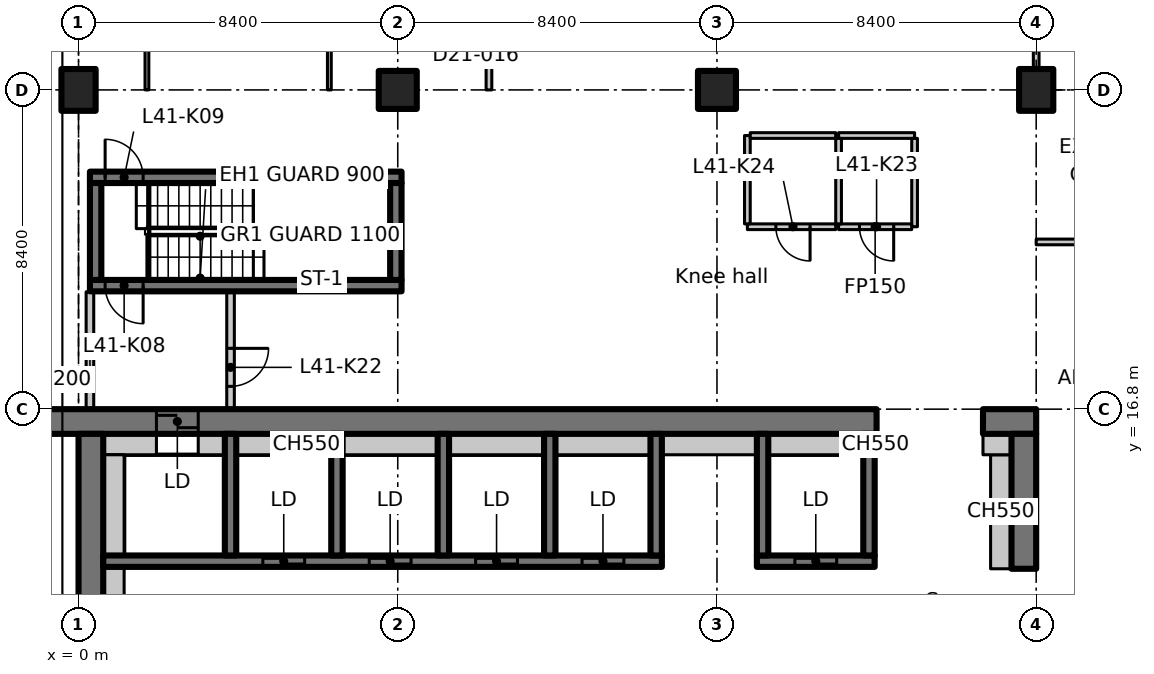
"""IFC4 building model, lengths in metres.
Left out: names, types, materials, properties, quantities, classifications, styles, units other than length and angle.
Written with IfcOpenShell. Run it as: python <this file> out.ifc"""

import sys

from ifc_helpers import new_model, si_unit, direction, frame, frame_2d, origin, origin_2d, place, context, subcontext, project, spatial, polyline, rectangle, outline, extrude, element, fill, save


model = new_model("IFC4")
c1 = context("Model", 3, precision=1e-05, world=origin(), true_north=direction((0.0, 1.0)))
c2 = subcontext(c1, "Body", "Model", "MODEL_VIEW")
j1 = project(units=[si_unit("LENGTHUNIT", "METRE"), si_unit("PLANEANGLEUNIT", "RADIAN")], contexts=[c1])
p1 = place(None, origin())
s1 = spatial("IfcSite", under=j1, at=p1, CompositionType="ELEMENT")
p2 = place(p1, origin())
s2 = spatial("IfcBuilding", under=s1, at=p2, CompositionType="ELEMENT")
p3 = place(p2, frame((0.0, 0.0, 166.8)))
s3 = spatial("IfcBuildingStorey", under=s2, at=p3, CompositionType="ELEMENT", Elevation=166.8)
p4 = place(p3, frame((0.0, 25.2, 0.0), z_axis=(0.0, 0.0, 1.0), x_axis=(1.0, 0.0, 0.0)))
e1 = element("IfcColumn", 1, at=p4, inside=s3, PredefinedType="COLUMN", context=c2, shape_type="SweptSolid", body=[
    extrude(rectangle(XDim=0.9, YDim=1.1, at=origin_2d()), origin(), (0.0, 0.0, 1.0), 3.35),
])
for number, where, z_axis, x_axis in (
    (2, (8.4, 25.2, 0.0), (0.0, 0.0, 1.0), (1.0, 0.0, 0.0)),
    (3, (16.8, 25.2, 0.0), (0.0, 0.0, 1.0), (1.0, 0.0, 0.0)),
):
    element("IfcColumn", number, at=place(p3, frame(where, z_axis=z_axis, x_axis=x_axis)), inside=s3, PredefinedType="COLUMN", context=c2, shape_type="SweptSolid", body=[
        extrude(rectangle(XDim=1.0, YDim=1.0, at=origin_2d()), origin(), (0.0, 0.0, 1.0), 3.35),
    ])
p5 = place(p3, frame((25.2, 25.2, 0.0), z_axis=(0.0, 0.0, 1.0), x_axis=(1.0, 0.0, 0.0)))
e4 = element("IfcColumn", 4, at=p5, inside=s3, PredefinedType="COLUMN", context=c2, shape_type="SweptSolid", body=[
    extrude(rectangle(XDim=0.9, YDim=1.1, at=origin_2d()), origin(), (0.0, 0.0, 1.0), 3.35),
])
p6 = place(p3, frame((-1.1, 16.475, 0.0), z_axis=(0.0, 0.0, 1.0), x_axis=(1.0, 0.0, 0.0)))
e5 = element("IfcWall", 5, at=p6, inside=s3, PredefinedType="SHEAR", context=c2, shape_type="SweptSolid", body=[
    extrude(rectangle(XDim=22.1, YDim=0.65, at=frame_2d((11.05, 0.0))), origin(), (0.0, 0.0, 1.0), 3.35),
])
p7 = place(p6, frame((3.15, 0.0, 0.0)))
e6 = element("IfcOpeningElement", 6, at=p7, cuts=e5, PredefinedType="OPENING", context=c2, shape_type="SweptSolid", body=[
    extrude(rectangle(XDim=1.1, YDim=2.3, at=frame_2d((0.55, 1.15))), frame((0.0, 0.335, 0.0), z_axis=(0.0, -1.0, 0.0), x_axis=(1.0, 0.0, 0.0)), (0.0, 0.0, 1.0), 0.67),
])
p8 = place(p3, frame((23.8, 16.475, 0.0), z_axis=(0.0, 0.0, 1.0), x_axis=(1.0, 0.0, 0.0)))
e7 = element("IfcWall", 7, at=p8, inside=s3, PredefinedType="SHEAR", context=c2, shape_type="SweptSolid", body=[
    extrude(rectangle(XDim=1.4, YDim=0.65, at=frame_2d((0.7, 0.0))), origin(), (0.0, 0.0, 1.0), 3.35),
])
p9 = place(p3, frame((0.325, 7.286, 0.0), z_axis=(0.0, 0.0, 1.0), x_axis=(0.0, 1.0, 0.0)))
e8 = element("IfcWall", 8, at=p9, inside=s3, PredefinedType="SHEAR", context=c2, shape_type="SweptSolid", body=[
    extrude(rectangle(XDim=8.864, YDim=0.65, at=frame_2d((4.432, 0.0))), origin(), (0.0, 0.0, 1.0), 3.35),
])
p10 = place(p3, frame((24.875, 12.6, 0.0), z_axis=(0.0, 0.0, 1.0), x_axis=(0.0, 1.0, 0.0)))
e9 = element("IfcWall", 9, at=p10, inside=s3, PredefinedType="SHEAR", context=c2, shape_type="SweptSolid", body=[
    extrude(rectangle(XDim=3.55, YDim=0.65, at=frame_2d((1.775, 0.0))), origin(), (0.0, 0.0, 1.0), 3.35),
])
p11 = place(p3, frame((24.275, 12.6, 0.0), z_axis=(0.0, 0.0, 1.0), x_axis=(0.0, 1.0, 0.0)))
e10 = element("IfcWall", 10, at=p11, inside=s3, PredefinedType="PARTITIONING", context=c2, shape_type="SweptSolid", body=[
    extrude(rectangle(XDim=3.0, YDim=0.55, at=frame_2d((1.5, 0.0))), origin(), (0.0, 0.0, 1.0), 3.35),
])
p12 = place(p3, frame((0.65, 15.875, 0.0), z_axis=(0.0, 0.0, 1.0), x_axis=(1.0, 0.0, 0.0)))
e11 = element("IfcWall", 11, at=p12, inside=s3, PredefinedType="PARTITIONING", context=c2, shape_type="SweptSolid", body=[
    extrude(rectangle(XDim=1.4, YDim=0.55, at=frame_2d((0.7, 0.0))), origin(), (0.0, 0.0, 1.0), 3.35),
])
p13 = place(p3, frame((23.8, 15.875, 0.0), z_axis=(0.0, 0.0, 1.0), x_axis=(1.0, 0.0, 0.0)))
e12 = element("IfcWall", 12, at=p13, inside=s3, PredefinedType="PARTITIONING", context=c2, shape_type="SweptSolid", body=[
    extrude(rectangle(XDim=0.75, YDim=0.55, at=frame_2d((0.375, 0.0))), origin(), (0.0, 0.0, 1.0), 3.35),
])
p14 = place(p3, frame((0.65, 12.8, 0.0), z_axis=(0.0, 0.0, 1.0), x_axis=(1.0, 0.0, 0.0)))
e13 = element("IfcWall", 13, at=p14, inside=s3, PredefinedType="SHEAR", context=c2, shape_type="SweptSolid", body=[
    extrude(rectangle(XDim=14.7, YDim=0.3, at=frame_2d((7.35, 0.0))), origin(), (0.0, 0.0, 1.0), 3.35),
])
p15 = place(p14, frame((4.2, 0.0, 0.0)))
e14 = element("IfcOpeningElement", 14, at=p15, cuts=e13, PredefinedType="OPENING", context=c2, shape_type="SweptSolid", body=[
    extrude(rectangle(XDim=1.1, YDim=2.3, at=frame_2d((0.55, 1.15))), frame((0.0, 0.16, 0.0), z_axis=(0.0, -1.0, 0.0), x_axis=(1.0, 0.0, 0.0)), (0.0, 0.0, 1.0), 0.32),
])
p16 = place(p14, frame((7.0, 0.0, 0.0)))
e15 = element("IfcOpeningElement", 15, at=p16, cuts=e13, PredefinedType="OPENING", context=c2, shape_type="SweptSolid", body=[
    extrude(rectangle(XDim=1.1, YDim=2.3, at=frame_2d((0.55, 1.15))), frame((0.0, 0.16, 0.0), z_axis=(0.0, -1.0, 0.0), x_axis=(1.0, 0.0, 0.0)), (0.0, 0.0, 1.0), 0.32),
])
p17 = place(p14, frame((9.8, 0.0, 0.0)))
e16 = element("IfcOpeningElement", 16, at=p17, cuts=e13, PredefinedType="OPENING", context=c2, shape_type="SweptSolid", body=[
    extrude(rectangle(XDim=1.1, YDim=2.3, at=frame_2d((0.55, 1.15))), frame((0.0, 0.16, 0.0), z_axis=(0.0, -1.0, 0.0), x_axis=(1.0, 0.0, 0.0)), (0.0, 0.0, 1.0), 0.32),
])
p18 = place(p14, frame((12.6, 0.0, 0.0)))
e17 = element("IfcOpeningElement", 17, at=p18, cuts=e13, PredefinedType="OPENING", context=c2, shape_type="SweptSolid", body=[
    extrude(rectangle(XDim=1.1, YDim=2.3, at=frame_2d((0.55, 1.15))), frame((0.0, 0.16, 0.0), z_axis=(0.0, -1.0, 0.0), x_axis=(1.0, 0.0, 0.0)), (0.0, 0.0, 1.0), 0.32),
])
for number, where, z_axis, x_axis in (
    (18, (4.0, 12.95, 0.0), (0.0, 0.0, 1.0), (0.0, 1.0, 0.0)),
    (19, (6.8, 12.95, 0.0), (0.0, 0.0, 1.0), (0.0, 1.0, 0.0)),
    (20, (9.6, 12.95, 0.0), (0.0, 0.0, 1.0), (0.0, 1.0, 0.0)),
    (21, (12.4, 12.95, 0.0), (0.0, 0.0, 1.0), (0.0, 1.0, 0.0)),
    (22, (15.2, 12.95, 0.0), (0.0, 0.0, 1.0), (0.0, 1.0, 0.0)),
):
    element("IfcWall", number, at=place(p3, frame(where, z_axis=z_axis, x_axis=x_axis)), inside=s3, PredefinedType="SHEAR", context=c2, shape_type="SweptSolid", body=[
        extrude(rectangle(XDim=3.2, YDim=0.3, at=frame_2d((1.6, 0.0))), origin(), (0.0, 0.0, 1.0), 3.35),
    ])
p19 = place(p3, frame((17.85, 12.8, 0.0), z_axis=(0.0, 0.0, 1.0), x_axis=(1.0, 0.0, 0.0)))
e23 = element("IfcWall", 23, at=p19, inside=s3, PredefinedType="SHEAR", context=c2, shape_type="SweptSolid", body=[
    extrude(rectangle(XDim=3.1, YDim=0.3, at=frame_2d((1.55, 0.0))), origin(), (0.0, 0.0, 1.0), 3.35),
])
p20 = place(p19, frame((1.0, 0.0, 0.0)))
e24 = element("IfcOpeningElement", 24, at=p20, cuts=e23, PredefinedType="OPENING", context=c2, shape_type="SweptSolid", body=[
    extrude(rectangle(XDim=1.1, YDim=2.3, at=frame_2d((0.55, 1.15))), frame((0.0, 0.16, 0.0), z_axis=(0.0, -1.0, 0.0), x_axis=(1.0, 0.0, 0.0)), (0.0, 0.0, 1.0), 0.32),
])
for number, where, z_axis, x_axis in (
    (25, (18.0, 12.95, 0.0), (0.0, 0.0, 1.0), (0.0, 1.0, 0.0)),
    (26, (20.8, 12.95, 0.0), (0.0, 0.0, 1.0), (0.0, 1.0, 0.0)),
):
    element("IfcWall", number, at=place(p3, frame(where, z_axis=z_axis, x_axis=x_axis)), inside=s3, PredefinedType="SHEAR", context=c2, shape_type="SweptSolid", body=[
        extrude(rectangle(XDim=3.2, YDim=0.3, at=frame_2d((1.6, 0.0))), origin(), (0.0, 0.0, 1.0), 3.35),
    ])
p21 = place(p3, frame((8.5, 20.05, 0.0), z_axis=(0.0, 0.0, 1.0), x_axis=(-1.0, 0.0, 0.0)))
e27 = element("IfcWall", 27, at=p21, inside=s3, PredefinedType="SHEAR", context=c2, shape_type="SweptSolid", body=[
    extrude(rectangle(XDim=8.2, YDim=0.3, at=frame_2d((4.1, 0.0))), origin(), (0.0, 0.0, 1.0), 3.35),
])
p22 = place(p21, frame((6.8, 0.0, 0.0)))
e28 = element("IfcOpeningElement", 28, at=p22, cuts=e27, PredefinedType="OPENING", context=c2, shape_type="SweptSolid", body=[
    extrude(rectangle(XDim=1.0, YDim=2.1, at=frame_2d((0.5, 1.05))), frame((0.0, 0.16, 0.0), z_axis=(0.0, -1.0, 0.0), x_axis=(1.0, 0.0, 0.0)), (0.0, 0.0, 1.0), 0.32),
])
p23 = place(p3, frame((0.3, 22.9, 0.0), z_axis=(0.0, 0.0, 1.0), x_axis=(1.0, 0.0, 0.0)))
e29 = element("IfcWall", 29, at=p23, inside=s3, PredefinedType="SHEAR", context=c2, shape_type="SweptSolid", body=[
    extrude(rectangle(XDim=8.2, YDim=0.3, at=frame_2d((4.1, 0.0))), origin(), (0.0, 0.0, 1.0), 3.35),
])
p24 = place(p23, frame((0.4, 0.0, 0.0)))
e30 = element("IfcOpeningElement", 30, at=p24, cuts=e29, PredefinedType="OPENING", context=c2, shape_type="SweptSolid", body=[
    extrude(rectangle(XDim=1.0, YDim=2.1, at=frame_2d((0.5, 1.05))), frame((0.0, 0.16, 0.0), z_axis=(0.0, -1.0, 0.0), x_axis=(1.0, 0.0, 0.0)), (0.0, 0.0, 1.0), 0.32),
])
for number, where, z_axis, x_axis in (
    (31, (0.45, 20.2, 0.0), (0.0, 0.0, 1.0), (0.0, 1.0, 0.0)),
    (32, (8.35, 20.2, 0.0), (0.0, 0.0, 1.0), (0.0, 1.0, 0.0)),
):
    element("IfcWall", number, at=place(p3, frame(where, z_axis=z_axis, x_axis=x_axis)), inside=s3, PredefinedType="SHEAR", context=c2, shape_type="SweptSolid", body=[
        extrude(rectangle(XDim=2.55, YDim=0.3, at=frame_2d((1.275, 0.0))), origin(), (0.0, 0.0, 1.0), 3.35),
    ])
p25 = place(p3, frame((0.3, 16.812, 0.0), z_axis=(0.0, 0.0, 1.0), x_axis=(0.0, 1.0, 0.0)))
e33 = element("IfcWall", 33, at=p25, inside=s3, PredefinedType="PARTITIONING", context=c2, shape_type="SweptSolid", body=[
    extrude(rectangle(XDim=3.076, YDim=0.2, at=frame_2d((1.538, 0.0))), origin(), (0.0, 0.0, 1.0), 2.98),
])
p26 = place(p3, frame((4.0, 19.888, 0.0), z_axis=(0.0, 0.0, 1.0), x_axis=(0.0, -1.0, 0.0)))
e34 = element("IfcWall", 34, at=p26, inside=s3, PredefinedType="PARTITIONING", context=c2, shape_type="SweptSolid", body=[
    extrude(rectangle(XDim=3.076, YDim=0.2, at=frame_2d((1.538, 0.0))), origin(), (0.0, 0.0, 1.0), 3.35),
])
p27 = place(p26, frame((1.488, 0.0, 0.0)))
e35 = element("IfcOpeningElement", 35, at=p27, cuts=e34, PredefinedType="OPENING", context=c2, shape_type="SweptSolid", body=[
    extrude(rectangle(XDim=1.0, YDim=2.1, at=frame_2d((0.5, 1.05))), frame((0.0, 0.11, 0.0), z_axis=(0.0, -1.0, 0.0), x_axis=(1.0, 0.0, 0.0)), (0.0, 0.0, 1.0), 0.22),
])
p28 = place(p3, frame((20.0, 24.0, 0.0), z_axis=(0.0, 0.0, 1.0), x_axis=(1.0, 0.0, 0.0)))
e36 = element("IfcWall", 36, at=p28, inside=s3, PredefinedType="PARTITIONING", context=c2, shape_type="SweptSolid", body=[
    extrude(rectangle(XDim=2.0, YDim=0.15, at=frame_2d((1.0, 0.0))), origin(), (0.0, 0.0, 1.0), 3.35),
])
p29 = place(p3, frame((22.0, 23.925, 0.0), z_axis=(0.0, 0.0, 1.0), x_axis=(0.0, -1.0, 0.0)))
e37 = element("IfcWall", 37, at=p29, inside=s3, PredefinedType="PARTITIONING", context=c2, shape_type="SweptSolid", body=[
    extrude(rectangle(XDim=2.325, YDim=0.15, at=frame_2d((1.163, 0.0))), origin(), (0.0, 0.0, 1.0), 3.35),
])
p30 = place(p3, frame((21.925, 21.6, 0.0), z_axis=(0.0, 0.0, 1.0), x_axis=(-1.0, 0.0, 0.0)))
e38 = element("IfcWall", 38, at=p30, inside=s3, PredefinedType="PARTITIONING", context=c2, shape_type="SweptSolid", body=[
    extrude(rectangle(XDim=1.925, YDim=0.15, at=frame_2d((0.962, 0.0))), origin(), (0.0, 0.0, 1.0), 3.35),
])
p31 = place(p30, frame((0.475, 0.0, 0.0)))
e39 = element("IfcOpeningElement", 39, at=p31, cuts=e38, PredefinedType="OPENING", context=c2, shape_type="SweptSolid", body=[
    extrude(rectangle(XDim=0.9, YDim=2.1, at=frame_2d((0.45, 1.05))), frame((0.0, 0.085, 0.0), z_axis=(0.0, -1.0, 0.0), x_axis=(1.0, 0.0, 0.0)), (0.0, 0.0, 1.0), 0.17),
])
p32 = place(p3, frame((20.0, 21.675, 0.0), z_axis=(0.0, 0.0, 1.0), x_axis=(0.0, 1.0, 0.0)))
e40 = element("IfcWall", 40, at=p32, inside=s3, PredefinedType="PARTITIONING", context=c2, shape_type="SweptSolid", body=[
    extrude(rectangle(XDim=2.25, YDim=0.15, at=frame_2d((1.125, 0.0))), origin(), (0.0, 0.0, 1.0), 3.35),
])
p33 = place(p3, frame((19.925, 21.6, 0.0), z_axis=(0.0, 0.0, 1.0), x_axis=(-1.0, 0.0, 0.0)))
e41 = element("IfcWall", 41, at=p33, inside=s3, PredefinedType="PARTITIONING", context=c2, shape_type="SweptSolid", body=[
    extrude(rectangle(XDim=2.325, YDim=0.15, at=frame_2d((1.163, 0.0))), origin(), (0.0, 0.0, 1.0), 3.35),
])
p34 = place(p33, frame((0.675, 0.0, 0.0)))
e42 = element("IfcOpeningElement", 42, at=p34, cuts=e41, PredefinedType="OPENING", context=c2, shape_type="SweptSolid", body=[
    extrude(rectangle(XDim=0.9, YDim=2.1, at=frame_2d((0.45, 1.05))), frame((0.0, 0.085, 0.0), z_axis=(0.0, -1.0, 0.0), x_axis=(1.0, 0.0, 0.0)), (0.0, 0.0, 1.0), 0.17),
])
p35 = place(p3, frame((17.6, 21.675, 0.0), z_axis=(0.0, 0.0, 1.0), x_axis=(0.0, 1.0, 0.0)))
e43 = element("IfcWall", 43, at=p35, inside=s3, PredefinedType="PARTITIONING", context=c2, shape_type="SweptSolid", body=[
    extrude(rectangle(XDim=2.325, YDim=0.15, at=frame_2d((1.163, 0.0))), origin(), (0.0, 0.0, 1.0), 3.35),
])
p36 = place(p3, frame((17.675, 24.0, 0.0), z_axis=(0.0, 0.0, 1.0), x_axis=(1.0, 0.0, 0.0)))
e44 = element("IfcWall", 44, at=p36, inside=s3, PredefinedType="PARTITIONING", context=c2, shape_type="SweptSolid", body=[
    extrude(rectangle(XDim=2.25, YDim=0.15, at=frame_2d((1.125, 0.0))), origin(), (0.0, 0.0, 1.0), 3.35),
])
p37 = place(p3, frame((0.925, 7.286, 0.0), z_axis=(0.0, 0.0, 1.0), x_axis=(0.0, 1.0, 0.0)))
e45 = element("IfcWall", 45, at=p37, inside=s3, PredefinedType="PARTITIONING", context=c2, shape_type="SweptSolid", body=[
    extrude(rectangle(XDim=5.364, YDim=0.55, at=frame_2d((2.682, 0.0))), origin(), (0.0, 0.0, 1.0), 3.35),
])
p38 = place(p3, frame((0.925, 12.95, 0.0), z_axis=(0.0, 0.0, 1.0), x_axis=(0.0, 1.0, 0.0)))
e46 = element("IfcWall", 46, at=p38, inside=s3, PredefinedType="PARTITIONING", context=c2, shape_type="SweptSolid", body=[
    extrude(rectangle(XDim=2.65, YDim=0.55, at=frame_2d((1.325, 0.0))), origin(), (0.0, 0.0, 1.0), 3.35),
])
p39 = place(p3, frame((3.15, 15.875, 0.0), z_axis=(0.0, 0.0, 1.0), x_axis=(1.0, 0.0, 0.0)))
e47 = element("IfcWall", 47, at=p39, inside=s3, PredefinedType="PARTITIONING", context=c2, shape_type="SweptSolid", body=[
    extrude(rectangle(XDim=0.7, YDim=0.55, at=frame_2d((0.35, 0.0))), origin(), (0.0, 0.0, 1.0), 3.35),
])
for number, where, z_axis, x_axis in (
    (48, (4.15, 15.875, 0.0), (0.0, 0.0, 1.0), (1.0, 0.0, 0.0)),
    (49, (6.95, 15.875, 0.0), (0.0, 0.0, 1.0), (1.0, 0.0, 0.0)),
    (50, (9.75, 15.875, 0.0), (0.0, 0.0, 1.0), (1.0, 0.0, 0.0)),
    (51, (12.55, 15.875, 0.0), (0.0, 0.0, 1.0), (1.0, 0.0, 0.0)),
    (52, (15.35, 15.875, 0.0), (0.0, 0.0, 1.0), (1.0, 0.0, 0.0)),
    (53, (18.15, 15.875, 0.0), (0.0, 0.0, 1.0), (1.0, 0.0, 0.0)),
):
    element("IfcWall", number, at=place(p3, frame(where, z_axis=z_axis, x_axis=x_axis)), inside=s3, PredefinedType="PARTITIONING", context=c2, shape_type="SweptSolid", body=[
        extrude(rectangle(XDim=2.5, YDim=0.55, at=frame_2d((1.25, 0.0))), origin(), (0.0, 0.0, 1.0), 3.35),
    ])
p40 = place(p3, frame((20.95, 15.875, 0.0), z_axis=(0.0, 0.0, 1.0), x_axis=(1.0, 0.0, 0.0)))
e54 = element("IfcWall", 54, at=p40, inside=s3, PredefinedType="PARTITIONING", context=c2, shape_type="SweptSolid", body=[
    extrude(rectangle(XDim=0.05, YDim=0.55, at=frame_2d((0.025, 0.0))), origin(), (0.0, 0.0, 1.0), 3.35),
])
p41 = place(p3, frame((25.2, 21.2, 0.0), z_axis=(0.0, 0.0, 1.0), x_axis=(1.0, 0.0, 0.0)))
e55 = element("IfcWall", 55, at=p41, inside=s3, PredefinedType="PARTITIONING", context=c2, shape_type="SweptSolid", body=[
    extrude(rectangle(XDim=4.2, YDim=0.15, at=frame_2d((2.1, 0.0))), origin(), (0.0, 0.0, 1.0), 3.33),
])
p42 = place(p3, frame((25.2, 31.0, 0.0), z_axis=(0.0, 0.0, 1.0), x_axis=(0.0, -1.0, 0.0)))
e56 = element("IfcWall", 56, at=p42, inside=s3, PredefinedType="PARTITIONING", context=c2, shape_type="SweptSolid", body=[
    extrude(outline(polyline([(0.0, 0.0), (5.23, 0.0), (5.23, 2.98), (0.0, 2.98), (0.0, 0.0)])), frame((0.0, 0.075, 0.0), z_axis=(0.0, -1.0, 0.0), x_axis=(1.0, 0.0, 0.0)), (0.0, 0.0, 1.0), 0.15),
])
p43 = place(p42, frame((2.03, 0.0, 0.0)))
e57 = element("IfcOpeningElement", 57, at=p43, cuts=e56, PredefinedType="OPENING", context=c2, shape_type="SweptSolid", body=[
    extrude(rectangle(XDim=1.1, YDim=2.1, at=frame_2d((0.55, 1.05))), frame((0.0, 0.085, 0.0), z_axis=(0.0, -1.0, 0.0), x_axis=(1.0, 0.0, 0.0)), (0.0, 0.0, 1.0), 0.17),
])
p44 = place(p3, frame((10.8, 25.2, 0.0), z_axis=(0.0, 0.0, 1.0), x_axis=(0.0, 1.0, 0.0)))
e58 = element("IfcWall", 58, at=p44, inside=s3, PredefinedType="PARTITIONING", context=c2, shape_type="SweptSolid", body=[
    extrude(rectangle(XDim=4.2, YDim=0.15, at=frame_2d((2.1, 0.0))), origin(), (0.0, 0.0, 1.0), 3.33),
])
for number, where, z_axis, x_axis in (
    (59, (1.8, 29.4, 0.0), (0.0, 0.0, 1.0), (0.0, -1.0, 0.0)),
    (60, (6.6, 29.4, 0.0), (0.0, 0.0, 1.0), (0.0, -1.0, 0.0)),
):
    element("IfcWall", number, at=place(p3, frame(where, z_axis=z_axis, x_axis=x_axis)), inside=s3, PredefinedType="PARTITIONING", context=c2, shape_type="SweptSolid", body=[
        extrude(rectangle(XDim=4.2, YDim=0.1, at=frame_2d((2.1, 0.0))), origin(), (0.0, 0.0, 1.0), 3.33),
    ])
p45 = place(p7, origin())
e61 = element("IfcDoor", 61, at=p45, inside=s3, OperationType="SLIDING_TO_LEFT", PredefinedType="DOOR", context=c2, shape_type="SweptSolid", body=[
    extrude(rectangle(XDim=1.1, YDim=2.3, at=frame_2d((0.55, 1.15))), frame((0.0, 0.025, 0.0), z_axis=(0.0, -1.0, 0.0), x_axis=(1.0, 0.0, 0.0)), (0.0, 0.0, 1.0), 0.05),
])
fill(e6, e61)
p46 = place(p15, origin())
e62 = element("IfcDoor", 62, at=p46, inside=s3, OperationType="SLIDING_TO_LEFT", PredefinedType="DOOR", context=c2, shape_type="SweptSolid", body=[
    extrude(rectangle(XDim=1.1, YDim=2.3, at=frame_2d((0.55, 1.15))), frame((0.0, 0.025, 0.0), z_axis=(0.0, -1.0, 0.0), x_axis=(1.0, 0.0, 0.0)), (0.0, 0.0, 1.0), 0.05),
])
fill(e14, e62)
p47 = place(p16, origin())
e63 = element("IfcDoor", 63, at=p47, inside=s3, OperationType="SLIDING_TO_LEFT", PredefinedType="DOOR", context=c2, shape_type="SweptSolid", body=[
    extrude(rectangle(XDim=1.1, YDim=2.3, at=frame_2d((0.55, 1.15))), frame((0.0, 0.025, 0.0), z_axis=(0.0, -1.0, 0.0), x_axis=(1.0, 0.0, 0.0)), (0.0, 0.0, 1.0), 0.05),
])
fill(e15, e63)
p48 = place(p17, origin())
e64 = element("IfcDoor", 64, at=p48, inside=s3, OperationType="SLIDING_TO_LEFT", PredefinedType="DOOR", context=c2, shape_type="SweptSolid", body=[
    extrude(rectangle(XDim=1.1, YDim=2.3, at=frame_2d((0.55, 1.15))), frame((0.0, 0.025, 0.0), z_axis=(0.0, -1.0, 0.0), x_axis=(1.0, 0.0, 0.0)), (0.0, 0.0, 1.0), 0.05),
])
fill(e16, e64)
p49 = place(p18, origin())
e65 = element("IfcDoor", 65, at=p49, inside=s3, OperationType="SLIDING_TO_LEFT", PredefinedType="DOOR", context=c2, shape_type="SweptSolid", body=[
    extrude(rectangle(XDim=1.1, YDim=2.3, at=frame_2d((0.55, 1.15))), frame((0.0, 0.025, 0.0), z_axis=(0.0, -1.0, 0.0), x_axis=(1.0, 0.0, 0.0)), (0.0, 0.0, 1.0), 0.05),
])
fill(e17, e65)
p50 = place(p20, origin())
e66 = element("IfcDoor", 66, at=p50, inside=s3, OperationType="SLIDING_TO_LEFT", PredefinedType="DOOR", context=c2, shape_type="SweptSolid", body=[
    extrude(rectangle(XDim=1.1, YDim=2.3, at=frame_2d((0.55, 1.15))), frame((0.0, 0.025, 0.0), z_axis=(0.0, -1.0, 0.0), x_axis=(1.0, 0.0, 0.0)), (0.0, 0.0, 1.0), 0.05),
])
fill(e24, e66)
p51 = place(p22, origin())
e67 = element("IfcDoor", 67, at=p51, inside=s3, OperationType="SINGLE_SWING_RIGHT", PredefinedType="DOOR", context=c2, shape_type="SweptSolid", body=[
    extrude(rectangle(XDim=1.0, YDim=2.1, at=frame_2d((0.5, 1.05))), frame((0.0, 0.025, 0.0), z_axis=(0.0, -1.0, 0.0), x_axis=(1.0, 0.0, 0.0)), (0.0, 0.0, 1.0), 0.05),
])
fill(e28, e67)
p52 = place(p24, origin())
e68 = element("IfcDoor", 68, at=p52, inside=s3, OperationType="SINGLE_SWING_LEFT", PredefinedType="DOOR", context=c2, shape_type="SweptSolid", body=[
    extrude(rectangle(XDim=1.0, YDim=2.1, at=frame_2d((0.5, 1.05))), frame((0.0, 0.025, 0.0), z_axis=(0.0, -1.0, 0.0), x_axis=(1.0, 0.0, 0.0)), (0.0, 0.0, 1.0), 0.05),
])
fill(e30, e68)
p53 = place(p27, origin())
e69 = element("IfcDoor", 69, at=p53, inside=s3, OperationType="SINGLE_SWING_RIGHT", PredefinedType="DOOR", context=c2, shape_type="SweptSolid", body=[
    extrude(rectangle(XDim=1.0, YDim=2.1, at=frame_2d((0.5, 1.05))), frame((0.0, 0.025, 0.0), z_axis=(0.0, -1.0, 0.0), x_axis=(1.0, 0.0, 0.0)), (0.0, 0.0, 1.0), 0.05),
])
fill(e35, e69)
p54 = place(p31, origin())
e70 = element("IfcDoor", 70, at=p54, inside=s3, OperationType="SINGLE_SWING_LEFT", PredefinedType="DOOR", context=c2, shape_type="SweptSolid", body=[
    extrude(rectangle(XDim=0.9, YDim=2.1, at=frame_2d((0.45, 1.05))), frame((0.0, 0.025, 0.0), z_axis=(0.0, -1.0, 0.0), x_axis=(1.0, 0.0, 0.0)), (0.0, 0.0, 1.0), 0.05),
])
fill(e39, e70)
p55 = place(p34, origin())
e71 = element("IfcDoor", 71, at=p55, inside=s3, OperationType="SINGLE_SWING_RIGHT", PredefinedType="DOOR", context=c2, shape_type="SweptSolid", body=[
    extrude(rectangle(XDim=0.9, YDim=2.1, at=frame_2d((0.45, 1.05))), frame((0.0, 0.025, 0.0), z_axis=(0.0, -1.0, 0.0), x_axis=(1.0, 0.0, 0.0)), (0.0, 0.0, 1.0), 0.05),
])
fill(e42, e71)
save(model, sys.argv[1])
